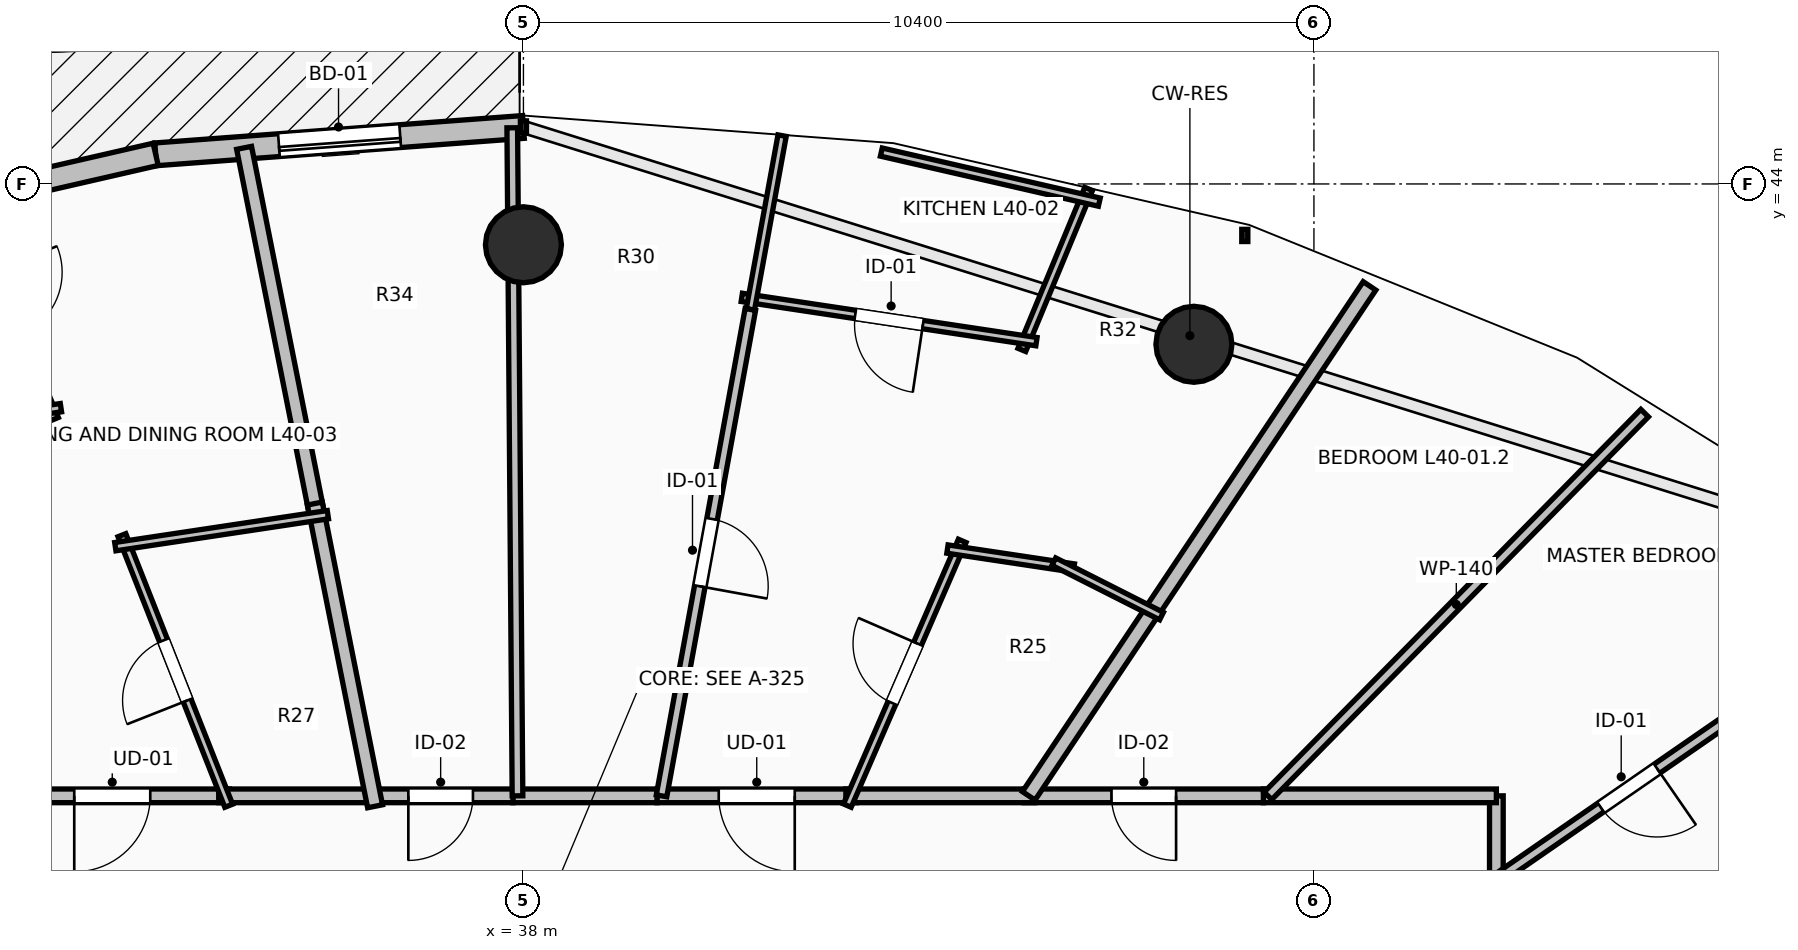
"""IFC4 building model, lengths in metres.
Left out: names, types, materials, properties, quantities, classifications, styles, units other than length and angle.
Written with IfcOpenShell. Run it as: python <this file> out.ifc"""

import sys

from ifc_helpers import new_model, si_unit, direction, frame, frame_2d, origin, origin_2d, place, context, subcontext, project, spatial, rectangle, circle, extrude, element, fill, save


model = new_model("IFC4")
c1 = context("Model", 3, precision=1e-05, world=origin(), true_north=direction((0.0, 1.0)))
c2 = subcontext(c1, "Body", "Model", "MODEL_VIEW")
j1 = project(units=[si_unit("LENGTHUNIT", "METRE"), si_unit("PLANEANGLEUNIT", "RADIAN")], contexts=[c1])
p1 = place(None, origin())
s1 = spatial("IfcSite", under=j1, at=p1, CompositionType="ELEMENT")
p2 = place(p1, origin())
s2 = spatial("IfcBuilding", under=s1, at=p2, CompositionType="ELEMENT")
p3 = place(p2, frame((0.0, 0.0, 150.1)))
s3 = spatial("IfcBuildingStorey", under=s2, at=p3, CompositionType="ELEMENT", Elevation=150.1)
for number, where, z_axis, x_axis in (
    (1, (46.821, 41.891, 0.0), (0.0, 0.0, 1.0), (0.383, 0.924, 0.0)),
    (2, (38.0, 43.2, 0.0), (0.0, 0.0, 1.0), (0.0, 1.0, 0.0)),
):
    element("IfcColumn", number, at=place(p3, frame(where, z_axis=z_axis, x_axis=x_axis)), inside=s3, PredefinedType="COLUMN", context=c2, shape_type="SweptSolid", body=[
        extrude(circle(Radius=0.5, at=origin_2d()), origin(), (0.0, 0.0, 1.0), 3.5),
    ])
p4 = place(p3, frame((38.0, 44.75, 0.0), z_axis=(0.0, 0.0, 1.0), x_axis=(-0.997237740067, -0.074275768499, 0.0)))
e3 = element("IfcWall", 3, at=p4, inside=s3, PredefinedType="STANDARD", context=c2, shape_type="SweptSolid", body=[
    extrude(rectangle(XDim=4.852, YDim=0.3, at=frame_2d((2.426, 0.0))), origin(), (0.0, 0.0, 1.0), 3.24),
])
p5 = place(p4, frame((1.626, 0.0, 0.0)))
e4 = element("IfcOpeningElement", 4, at=p5, cuts=e3, PredefinedType="OPENING", context=c2, shape_type="SweptSolid", body=[
    extrude(rectangle(XDim=1.6, YDim=2.3, at=frame_2d((0.8, 1.15))), frame((0.0, 0.165, 0.0), z_axis=(0.0, -1.0, 0.0), x_axis=(1.0, 0.0, 0.0)), (0.0, 0.0, 1.0), 0.33),
])
p6 = place(p3, frame((33.162, 44.39, 0.0), z_axis=(0.0, 0.0, 1.0), x_axis=(-0.974698897188, -0.223521944832, 0.0)))
e5 = element("IfcWall", 5, at=p6, inside=s3, PredefinedType="STANDARD", context=c2, shape_type="SweptSolid", body=[
    extrude(rectangle(XDim=4.773, YDim=0.3, at=frame_2d((2.387, 0.0))), origin(), (0.0, 0.0, 1.0), 3.24),
])
p7 = place(p3, frame((50.8, 34.92, 0.0), z_axis=(0.0, 0.0, 1.0), x_axis=(0.0, 1.0, 0.0)))
e6 = element("IfcWall", 6, at=p7, inside=s3, PredefinedType="PARTITIONING", context=c2, shape_type="SweptSolid", body=[
    extrude(rectangle(XDim=1.03, YDim=0.18, at=frame_2d((0.515, 0.0))), origin(), (0.0, 0.0, 1.0), 2.432),
])
p8 = place(p3, frame((50.8, 35.95, 0.0), z_axis=(0.0, 0.0, 1.0), x_axis=(-1.0, 0.0, 0.0)))
e7 = element("IfcWall", 7, at=p8, inside=s3, PredefinedType="PARTITIONING", context=c2, shape_type="SweptSolid", body=[
    extrude(rectangle(XDim=3.065, YDim=0.18, at=frame_2d((1.532, 0.0))), origin(), (0.0, 0.0, 1.0), 2.432),
])
p9 = place(p3, frame((47.735, 35.95, 0.0), z_axis=(0.0, 0.0, 1.0), x_axis=(-1.0, 0.0, 0.0)))
e8 = element("IfcWall", 8, at=p9, inside=s3, PredefinedType="PARTITIONING", context=c2, shape_type="SweptSolid", body=[
    extrude(rectangle(XDim=3.147, YDim=0.18, at=frame_2d((1.574, 0.0))), origin(), (0.0, 0.0, 1.0), 2.886),
])
p10 = place(p9, frame((1.148, 0.0, 0.0)))
e9 = element("IfcOpeningElement", 9, at=p10, cuts=e8, PredefinedType="OPENING", context=c2, shape_type="SweptSolid", body=[
    extrude(rectangle(XDim=0.85, YDim=2.1, at=frame_2d((0.425, 1.05))), frame((0.0, 0.105, 0.0), z_axis=(0.0, -1.0, 0.0), x_axis=(1.0, 0.0, 0.0)), (0.0, 0.0, 1.0), 0.21),
])
p11 = place(p3, frame((42.382, 35.95, 0.0), z_axis=(0.0, 0.0, 1.0), x_axis=(-1.0, 0.0, 0.0)))
e10 = element("IfcWall", 10, at=p11, inside=s3, PredefinedType="PARTITIONING", context=c2, shape_type="SweptSolid", body=[
    extrude(rectangle(XDim=2.625, YDim=0.18, at=frame_2d((1.312, 0.0))), origin(), (0.0, 0.0, 1.0), 2.886),
])
p12 = place(p11, frame((0.812, 0.0, 0.0)))
e11 = element("IfcOpeningElement", 11, at=p12, cuts=e10, PredefinedType="OPENING", context=c2, shape_type="SweptSolid", body=[
    extrude(rectangle(XDim=1.0, YDim=2.15, at=frame_2d((0.5, 1.075))), frame((0.0, 0.105, 0.0), z_axis=(0.0, -1.0, 0.0), x_axis=(1.0, 0.0, 0.0)), (0.0, 0.0, 1.0), 0.21),
])
p13 = place(p3, frame((44.728, 35.95, 0.0), z_axis=(0.0, 0.0, 1.0), x_axis=(-1.0, 0.0, 0.0)))
e12 = element("IfcWall", 12, at=p13, inside=s3, PredefinedType="PARTITIONING", context=c2, shape_type="SweptSolid", body=[
    extrude(rectangle(XDim=2.486, YDim=0.18, at=frame_2d((1.243, 0.0))), origin(), (0.0, 0.0, 1.0), 2.886),
])
p14 = place(p3, frame((39.757, 35.95, 0.0), z_axis=(0.0, 0.0, 1.0), x_axis=(-1.0, 0.0, 0.0)))
e13 = element("IfcWall", 13, at=p14, inside=s3, PredefinedType="PARTITIONING", context=c2, shape_type="SweptSolid", body=[
    extrude(rectangle(XDim=1.895, YDim=0.18, at=frame_2d((0.948, 0.0))), origin(), (0.0, 0.0, 1.0), 2.886),
])
p15 = place(p3, frame((37.862, 35.95, 0.0), z_axis=(0.0, 0.0, 1.0), x_axis=(-1.0, 0.0, 0.0)))
e14 = element("IfcWall", 14, at=p15, inside=s3, PredefinedType="PARTITIONING", context=c2, shape_type="SweptSolid", body=[
    extrude(rectangle(XDim=1.902, YDim=0.18, at=frame_2d((0.951, 0.0))), origin(), (0.0, 0.0, 1.0), 2.886),
])
p16 = place(p15, frame((0.526, 0.0, 0.0)))
e15 = element("IfcOpeningElement", 15, at=p16, cuts=e14, PredefinedType="OPENING", context=c2, shape_type="SweptSolid", body=[
    extrude(rectangle(XDim=0.85, YDim=2.1, at=frame_2d((0.425, 1.05))), frame((0.0, 0.105, 0.0), z_axis=(0.0, -1.0, 0.0), x_axis=(1.0, 0.0, 0.0)), (0.0, 0.0, 1.0), 0.21),
])
p17 = place(p3, frame((34.131, 35.95, 0.0), z_axis=(0.0, 0.0, 1.0), x_axis=(-1.0, 0.0, 0.0)))
e16 = element("IfcWall", 16, at=p17, inside=s3, PredefinedType="PARTITIONING", context=c2, shape_type="SweptSolid", body=[
    extrude(rectangle(XDim=3.081, YDim=0.18, at=frame_2d((1.541, 0.0))), origin(), (0.0, 0.0, 1.0), 2.886),
])
p18 = place(p17, frame((1.041, 0.0, 0.0)))
e17 = element("IfcOpeningElement", 17, at=p18, cuts=e16, PredefinedType="OPENING", context=c2, shape_type="SweptSolid", body=[
    extrude(rectangle(XDim=1.0, YDim=2.15, at=frame_2d((0.5, 1.075))), frame((0.0, 0.105, 0.0), z_axis=(0.0, -1.0, 0.0), x_axis=(1.0, 0.0, 0.0)), (0.0, 0.0, 1.0), 0.21),
])
p19 = place(p3, frame((36.1, 35.95, 0.0), z_axis=(0.0, 0.0, 1.0), x_axis=(-1.0, 0.0, 0.0)))
e18 = element("IfcWall", 18, at=p19, inside=s3, PredefinedType="PARTITIONING", context=c2, shape_type="SweptSolid", body=[
    extrude(rectangle(XDim=2.109, YDim=0.18, at=frame_2d((1.055, 0.0))), origin(), (0.0, 0.0, 1.0), 2.886),
])
p20 = place(p3, frame((54.29, 37.259, 0.0), z_axis=(0.0, 0.0, 1.0), x_axis=(-0.822672586971, -0.568515448027, 0.0)))
e19 = element("IfcWall", 19, at=p20, inside=s3, PredefinedType="PARTITIONING", context=c2, shape_type="SweptSolid", body=[
    extrude(rectangle(XDim=4.242, YDim=0.14, at=frame_2d((2.121, 0.0))), origin(), (0.0, 0.0, 1.0), 2.432),
])
p21 = place(p20, frame((1.671, 0.0, 0.0)))
e20 = element("IfcOpeningElement", 20, at=p21, cuts=e19, PredefinedType="OPENING", context=c2, shape_type="SweptSolid", body=[
    extrude(rectangle(XDim=0.9, YDim=2.1, at=frame_2d((0.45, 1.05))), frame((0.0, 0.085, 0.0), z_axis=(0.0, -1.0, 0.0), x_axis=(1.0, 0.0, 0.0)), (0.0, 0.0, 1.0), 0.17),
])
p22 = place(p3, frame((52.751, 40.985, 0.0), z_axis=(0.0, 0.0, 1.0), x_axis=(-0.701486551238, -0.712682691268, 0.0)))
e21 = element("IfcWall", 21, at=p22, inside=s3, PredefinedType="PARTITIONING", context=c2, shape_type="SweptSolid", body=[
    extrude(rectangle(XDim=7.065, YDim=0.14, at=frame_2d((3.533, 0.0))), origin(), (0.0, 0.0, 1.0), 2.432),
])
p23 = place(p3, frame((49.131, 42.659, 0.0), z_axis=(0.0, 0.0, 1.0), x_axis=(-0.555600584712, -0.831449331149, 0.0)))
e22 = element("IfcWall", 22, at=p23, inside=s3, PredefinedType="PARTITIONING", context=c2, shape_type="SweptSolid", body=[
    extrude(rectangle(XDim=8.069, YDim=0.2, at=frame_2d((4.035, 0.0))), origin(), (0.0, 0.0, 1.0), 2.432),
])
p24 = place(p3, frame((42.261, 35.822, 0.0), z_axis=(0.0, 0.0, 1.0), x_axis=(0.398098222937, 0.917342795739, 0.0)))
e23 = element("IfcWall", 23, at=p24, inside=s3, PredefinedType="PARTITIONING", context=c2, shape_type="SweptSolid", body=[
    extrude(rectangle(XDim=3.797, YDim=0.11, at=frame_2d((1.898, 0.0))), origin(), (0.0, 0.0, 1.0), 2.886),
])
p25 = place(p24, frame((1.473, 0.0, 0.0)))
e24 = element("IfcOpeningElement", 24, at=p25, cuts=e23, PredefinedType="OPENING", context=c2, shape_type="SweptSolid", body=[
    extrude(rectangle(XDim=0.85, YDim=2.1, at=frame_2d((0.425, 1.05))), frame((0.0, 0.07, 0.0), z_axis=(0.0, -1.0, 0.0), x_axis=(1.0, 0.0, 0.0)), (0.0, 0.0, 1.0), 0.14),
])
p26 = place(p3, frame((43.579, 39.197, 0.0), z_axis=(0.0, 0.0, 1.0), x_axis=(0.988928896576, -0.148390153032, 0.0)))
e25 = element("IfcWall", 25, at=p26, inside=s3, PredefinedType="PARTITIONING", context=c2, shape_type="SweptSolid", body=[
    extrude(rectangle(XDim=1.681, YDim=0.11, at=frame_2d((0.841, 0.0))), origin(), (0.0, 0.0, 1.0), 3.24),
])
p27 = place(p3, frame((44.978, 39.031, 0.0), z_axis=(0.0, 0.0, 1.0), x_axis=(0.892388427115, -0.451268096758, 0.0)))
e26 = element("IfcWall", 26, at=p27, inside=s3, PredefinedType="PARTITIONING", context=c2, shape_type="SweptSolid", body=[
    extrude(rectangle(XDim=1.588, YDim=0.11, at=frame_2d((0.794, 0.0))), origin(), (0.0, 0.0, 1.0), 2.972),
])
p28 = place(p3, frame((45.436, 43.934, 0.0), z_axis=(0.0, 0.0, 1.0), x_axis=(-0.383057133185, -0.923724652002, 0.0)))
e27 = element("IfcWall", 27, at=p28, inside=s3, PredefinedType="PARTITIONING", context=c2, shape_type="SweptSolid", body=[
    extrude(rectangle(XDim=2.292, YDim=0.11, at=frame_2d((1.146, 0.0))), origin(), (0.0, 0.0, 1.0), 2.728),
])
p29 = place(p3, frame((44.75, 41.925, 0.0), z_axis=(0.0, 0.0, 1.0), x_axis=(-0.988899781081, 0.148584060306, 0.0)))
e28 = element("IfcWall", 28, at=p29, inside=s3, PredefinedType="PARTITIONING", context=c2, shape_type="SweptSolid", body=[
    extrude(rectangle(XDim=3.92, YDim=0.11, at=frame_2d((1.96, 0.0))), origin(), (0.0, 0.0, 1.0), 3.24),
])
p30 = place(p29, frame((1.51, 0.0, 0.0)))
e29 = element("IfcOpeningElement", 29, at=p30, cuts=e28, PredefinedType="OPENING", context=c2, shape_type="SweptSolid", body=[
    extrude(rectangle(XDim=0.9, YDim=2.1, at=frame_2d((0.45, 1.05))), frame((0.0, 0.07, 0.0), z_axis=(0.0, -1.0, 0.0), x_axis=(1.0, 0.0, 0.0)), (0.0, 0.0, 1.0), 0.14),
])
p31 = place(p3, frame((40.986, 42.349, 0.0), z_axis=(0.0, 0.0, 1.0), x_axis=(0.179523238587, 0.983753732805, 0.0)))
e30 = element("IfcWall", 30, at=p31, inside=s3, PredefinedType="PARTITIONING", context=c2, shape_type="SweptSolid", body=[
    extrude(rectangle(XDim=2.324, YDim=0.11, at=frame_2d((1.162, 0.0))), origin(), (0.0, 0.0, 1.0), 2.728),
])
p32 = place(p3, frame((45.576, 43.761, 0.0), z_axis=(0.0, 0.0, 1.0), x_axis=(-0.974642290338, 0.223768643657, 0.0)))
e31 = element("IfcWall", 31, at=p32, inside=s3, PredefinedType="PARTITIONING", context=c2, shape_type="SweptSolid", body=[
    extrude(rectangle(XDim=2.943, YDim=0.11, at=frame_2d((1.471, 0.0))), origin(), (0.0, 0.0, 1.0), 3.24),
])
p33 = place(p3, frame((40.986, 42.349, 0.0), z_axis=(0.0, 0.0, 1.0), x_axis=(-0.179654893395, -0.983729698281, 0.0)))
e32 = element("IfcWall", 32, at=p33, inside=s3, PredefinedType="PARTITIONING", context=c2, shape_type="SweptSolid", body=[
    extrude(rectangle(XDim=6.505, YDim=0.14, at=frame_2d((3.253, 0.0))), origin(), (0.0, 0.0, 1.0), 2.886),
])
p34 = place(p33, frame((2.802, 0.0, 0.0)))
e33 = element("IfcOpeningElement", 33, at=p34, cuts=e32, PredefinedType="OPENING", context=c2, shape_type="SweptSolid", body=[
    extrude(rectangle(XDim=0.9, YDim=2.1, at=frame_2d((0.45, 1.05))), frame((0.0, 0.085, 0.0), z_axis=(0.0, -1.0, 0.0), x_axis=(1.0, 0.0, 0.0)), (0.0, 0.0, 1.0), 0.17),
])
p35 = place(p3, frame((37.853, 44.739, 0.0), z_axis=(0.0, 0.0, 1.0), x_axis=(0.007860868226, -0.999969102898, 0.0)))
e34 = element("IfcWall", 34, at=p35, inside=s3, PredefinedType="PARTITIONING", context=c2, shape_type="SweptSolid", body=[
    extrude(rectangle(XDim=8.789, YDim=0.14, at=frame_2d((4.395, 0.0))), origin(), (0.0, 0.0, 1.0), 2.432),
])
p36 = place(p3, frame((34.325, 44.475, 0.0), z_axis=(0.0, 0.0, 1.0), x_axis=(0.195054941626, -0.980792317337, 0.0)))
e35 = element("IfcWall", 35, at=p36, inside=s3, PredefinedType="PARTITIONING", context=c2, shape_type="SweptSolid", body=[
    extrude(rectangle(XDim=4.911, YDim=0.2, at=frame_2d((2.456, 0.0))), origin(), (0.0, 0.0, 1.0), 2.432),
])
p37 = place(p3, frame((35.256, 39.795, 0.0), z_axis=(0.0, 0.0, 1.0), x_axis=(0.195214230991, -0.980760625239, 0.0)))
e36 = element("IfcWall", 36, at=p37, inside=s3, PredefinedType="PARTITIONING", context=c2, shape_type="SweptSolid", body=[
    extrude(rectangle(XDim=4.061, YDim=0.2, at=frame_2d((2.03, 0.0))), origin(), (0.0, 0.0, 1.0), 2.886),
])
p38 = place(p3, frame((34.122, 35.82, 0.0), z_axis=(0.0, 0.0, 1.0), x_axis=(-0.36711859649, 0.930174142896, 0.0)))
e37 = element("IfcWall", 37, at=p38, inside=s3, PredefinedType="PARTITIONING", context=c2, shape_type="SweptSolid", body=[
    extrude(rectangle(XDim=3.826, YDim=0.11, at=frame_2d((1.913, 0.0))), origin(), (0.0, 0.0, 1.0), 2.432),
])
p39 = place(p38, frame((1.488, 0.0, 0.0)))
e38 = element("IfcOpeningElement", 38, at=p39, cuts=e37, PredefinedType="OPENING", context=c2, shape_type="SweptSolid", body=[
    extrude(rectangle(XDim=0.85, YDim=2.1, at=frame_2d((0.425, 1.05))), frame((0.0, 0.07, 0.0), z_axis=(0.0, -1.0, 0.0), x_axis=(1.0, 0.0, 0.0)), (0.0, 0.0, 1.0), 0.14),
])
p40 = place(p3, frame((32.631, 39.228, 0.0), z_axis=(0.0, 0.0, 1.0), x_axis=(0.988890718673, 0.148644362566, 0.0)))
e39 = element("IfcWall", 39, at=p40, inside=s3, PredefinedType="PARTITIONING", context=c2, shape_type="SweptSolid", body=[
    extrude(rectangle(XDim=2.828, YDim=0.11, at=frame_2d((1.414, 0.0))), origin(), (0.0, 0.0, 1.0), 2.432),
])
p41 = place(p3, frame((30.576, 43.938, 0.0), z_axis=(0.0, 0.0, 1.0), x_axis=(0.382336453712, -0.924023179451, 0.0)))
e40 = element("IfcWall", 40, at=p41, inside=s3, PredefinedType="PARTITIONING", context=c2, shape_type="SweptSolid", body=[
    extrude(rectangle(XDim=3.28, YDim=0.11, at=frame_2d((1.64, 0.0))), origin(), (0.0, 0.0, 1.0), 2.728),
])
p42 = place(p41, frame((1.19, 0.0, 0.0)))
e41 = element("IfcOpeningElement", 41, at=p42, cuts=e40, PredefinedType="OPENING", context=c2, shape_type="SweptSolid", body=[
    extrude(rectangle(XDim=0.9, YDim=2.1, at=frame_2d((0.45, 1.05))), frame((0.0, 0.07, 0.0), z_axis=(0.0, -1.0, 0.0), x_axis=(1.0, 0.0, 0.0)), (0.0, 0.0, 1.0), 0.14),
])
p43 = place(p3, frame((31.915, 41.057, 0.0), z_axis=(0.0, 0.0, 1.0), x_axis=(-0.98883996758, -0.148981604626, 0.0)))
e42 = element("IfcWall", 42, at=p43, inside=s3, PredefinedType="PARTITIONING", context=c2, shape_type="SweptSolid", body=[
    extrude(rectangle(XDim=2.16, YDim=0.11, at=frame_2d((1.08, 0.0))), origin(), (0.0, 0.0, 1.0), 3.24),
])
p44 = place(p5, origin())
e43 = element("IfcDoor", 43, at=p44, inside=s3, OperationType="SLIDING_TO_LEFT", PredefinedType="DOOR", context=c2, shape_type="SweptSolid", body=[
    extrude(rectangle(XDim=1.6, YDim=2.3, at=frame_2d((0.8, 1.15))), frame((0.0, 0.025, 0.0), z_axis=(0.0, -1.0, 0.0), x_axis=(1.0, 0.0, 0.0)), (0.0, 0.0, 1.0), 0.05),
])
fill(e4, e43)
p45 = place(p12, origin())
e44 = element("IfcDoor", 44, at=p45, inside=s3, OperationType="SINGLE_SWING_LEFT", PredefinedType="DOOR", context=c2, shape_type="SweptSolid", body=[
    extrude(rectangle(XDim=1.0, YDim=2.15, at=frame_2d((0.5, 1.075))), frame((0.0, 0.025, 0.0), z_axis=(0.0, -1.0, 0.0), x_axis=(1.0, 0.0, 0.0)), (0.0, 0.0, 1.0), 0.05),
])
fill(e11, e44)
p46 = place(p18, origin())
e45 = element("IfcDoor", 45, at=p46, inside=s3, OperationType="SINGLE_SWING_RIGHT", PredefinedType="DOOR", context=c2, shape_type="SweptSolid", body=[
    extrude(rectangle(XDim=1.0, YDim=2.15, at=frame_2d((0.5, 1.075))), frame((0.0, 0.025, 0.0), z_axis=(0.0, -1.0, 0.0), x_axis=(1.0, 0.0, 0.0)), (0.0, 0.0, 1.0), 0.05),
])
fill(e17, e45)
p47 = place(p21, origin())
e46 = element("IfcDoor", 46, at=p47, inside=s3, OperationType="SINGLE_SWING_LEFT", PredefinedType="DOOR", context=c2, shape_type="SweptSolid", body=[
    extrude(rectangle(XDim=0.9, YDim=2.1, at=frame_2d((0.45, 1.05))), frame((0.0, 0.025, 0.0), z_axis=(0.0, -1.0, 0.0), x_axis=(1.0, 0.0, 0.0)), (0.0, 0.0, 1.0), 0.05),
])
fill(e20, e46)
p48 = place(p25, origin())
e47 = element("IfcDoor", 47, at=p48, inside=s3, OperationType="SINGLE_SWING_RIGHT", PredefinedType="DOOR", context=c2, shape_type="SweptSolid", body=[
    extrude(rectangle(XDim=0.85, YDim=2.1, at=frame_2d((0.425, 1.05))), frame((0.0, 0.025, 0.0), z_axis=(0.0, -1.0, 0.0), x_axis=(1.0, 0.0, 0.0)), (0.0, 0.0, 1.0), 0.05),
])
fill(e24, e47)
p49 = place(p30, origin())
e48 = element("IfcDoor", 48, at=p49, inside=s3, OperationType="SINGLE_SWING_LEFT", PredefinedType="DOOR", context=c2, shape_type="SweptSolid", body=[
    extrude(rectangle(XDim=0.9, YDim=2.1, at=frame_2d((0.45, 1.05))), frame((0.0, 0.025, 0.0), z_axis=(0.0, -1.0, 0.0), x_axis=(1.0, 0.0, 0.0)), (0.0, 0.0, 1.0), 0.05),
])
fill(e29, e48)
p50 = place(p34, origin())
e49 = element("IfcDoor", 49, at=p50, inside=s3, OperationType="SINGLE_SWING_RIGHT", PredefinedType="DOOR", context=c2, shape_type="SweptSolid", body=[
    extrude(rectangle(XDim=0.9, YDim=2.1, at=frame_2d((0.45, 1.05))), frame((0.0, 0.025, 0.0), z_axis=(0.0, -1.0, 0.0), x_axis=(1.0, 0.0, 0.0)), (0.0, 0.0, 1.0), 0.05),
])
fill(e33, e49)
p51 = place(p39, origin())
e50 = element("IfcDoor", 50, at=p51, inside=s3, OperationType="SINGLE_SWING_LEFT", PredefinedType="DOOR", context=c2, shape_type="SweptSolid", body=[
    extrude(rectangle(XDim=0.85, YDim=2.1, at=frame_2d((0.425, 1.05))), frame((0.0, 0.025, 0.0), z_axis=(0.0, -1.0, 0.0), x_axis=(1.0, 0.0, 0.0)), (0.0, 0.0, 1.0), 0.05),
])
fill(e38, e50)
p52 = place(p10, origin())
e51 = element("IfcDoor", 51, at=p52, inside=s3, OperationType="SINGLE_SWING_LEFT", PredefinedType="DOOR", context=c2, shape_type="SweptSolid", body=[
    extrude(rectangle(XDim=0.85, YDim=2.1, at=frame_2d((0.425, 1.05))), frame((0.0, 0.025, 0.0), z_axis=(0.0, -1.0, 0.0), x_axis=(1.0, 0.0, 0.0)), (0.0, 0.0, 1.0), 0.05),
])
fill(e9, e51)
p53 = place(p16, origin())
e52 = element("IfcDoor", 52, at=p53, inside=s3, OperationType="SINGLE_SWING_RIGHT", PredefinedType="DOOR", context=c2, shape_type="SweptSolid", body=[
    extrude(rectangle(XDim=0.85, YDim=2.1, at=frame_2d((0.425, 1.05))), frame((0.0, 0.025, 0.0), z_axis=(0.0, -1.0, 0.0), x_axis=(1.0, 0.0, 0.0)), (0.0, 0.0, 1.0), 0.05),
])
fill(e15, e52)
save(model, sys.argv[1])
